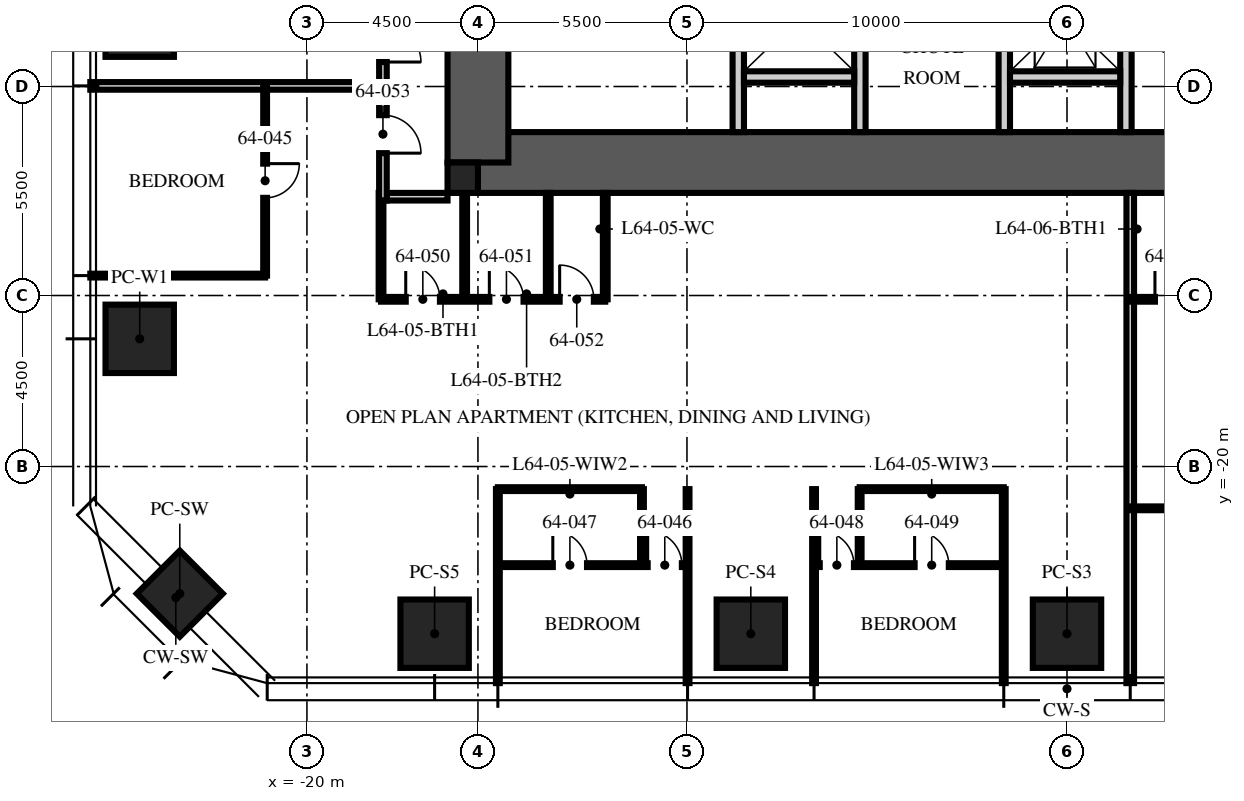
"""IFC4 building model, lengths in metres.
Left out: names, types, materials, properties, quantities, classifications, styles, units other than length and angle.
Written with IfcOpenShell. Run it as: python <this file> out.ifc"""

import sys

from ifc_helpers import new_model, si_unit, direction, frame, frame_2d, origin, origin_2d, place, context, subcontext, project, spatial, rectangle, extrude, element, fill, save


model = new_model("IFC4")
c1 = context("Model", 3, precision=1e-05, world=origin(), true_north=direction((0.0, 1.0)))
c2 = subcontext(c1, "Body", "Model", "MODEL_VIEW")
j1 = project(units=[si_unit("LENGTHUNIT", "METRE"), si_unit("PLANEANGLEUNIT", "RADIAN")], contexts=[c1])
p1 = place(None, origin())
s1 = spatial("IfcSite", under=j1, at=p1, CompositionType="ELEMENT")
p2 = place(p1, origin())
s2 = spatial("IfcBuilding", under=s1, at=p2, CompositionType="ELEMENT")
p3 = place(p2, frame((0.0, 0.0, 255.75)))
s3 = spatial("IfcBuildingStorey", under=s2, at=p3, CompositionType="ELEMENT", Elevation=255.75)
p4 = place(p3, frame((-15.5, -12.0, -0.25), z_axis=(0.0, 0.0, 1.0), x_axis=(1.0, 0.0, 0.0)))
e1 = element("IfcWall", 1, at=p4, inside=s3, PredefinedType="SHEAR", context=c2, shape_type="SweptSolid", body=[
    extrude(rectangle(XDim=31.0, YDim=1.6, at=frame_2d((15.5, 0.0))), origin(), (0.0, 0.0, 1.0), 3.75),
])
p5 = place(p3, frame((-15.5, -12.0, -0.25), z_axis=(0.0, 0.0, 1.0), x_axis=(0.0, 1.0, 0.0)))
e2 = element("IfcWall", 2, at=p5, inside=s3, PredefinedType="SHEAR", context=c2, shape_type="SweptSolid", body=[
    extrude(rectangle(XDim=24.0, YDim=1.6, at=frame_2d((12.0, 0.0))), origin(), (0.0, 0.0, 1.0), 3.75),
])
p6 = place(p5, frame((3.2, 0.0, 0.25)))
e3 = element("IfcOpeningElement", 3, at=p6, cuts=e2, PredefinedType="OPENING", context=c2, shape_type="SweptSolid", body=[
    extrude(rectangle(XDim=1.2, YDim=2.1, at=frame_2d((0.6, 1.05))), frame((0.0, 0.81, 0.0), z_axis=(0.0, -1.0, 0.0), x_axis=(1.0, 0.0, 0.0)), (0.0, 0.0, 1.0), 1.62),
])
p7 = place(p5, frame((19.3, 0.0, 0.25)))
e4 = element("IfcOpeningElement", 4, at=p7, cuts=e2, PredefinedType="OPENING", context=c2, shape_type="SweptSolid", body=[
    extrude(rectangle(XDim=1.8, YDim=2.1, at=frame_2d((0.9, 1.05))), frame((0.0, 0.81, 0.0), z_axis=(0.0, -1.0, 0.0), x_axis=(1.0, 0.0, 0.0)), (0.0, 0.0, 1.0), 1.62),
])
p8 = place(p3, frame((-15.9, -12.4, -0.25), z_axis=(0.0, 0.0, 1.0), x_axis=(1.0, 0.0, 0.0)))
e5 = element("IfcColumn", 5, at=p8, inside=s3, PredefinedType="COLUMN", context=c2, shape_type="SweptSolid", body=[
    extrude(rectangle(XDim=0.8, YDim=0.8, at=origin_2d()), origin(), (0.0, 0.0, 1.0), 3.75),
])
for number, where, z_axis, x_axis in (
    (6, (0.0, -24.4, 0.0), (0.0, 0.0, 1.0), (1.0, 0.0, 0.0)),
    (7, (-8.32, -24.4, 0.0), (0.0, 0.0, 1.0), (1.0, 0.0, 0.0)),
    (8, (-16.64, -24.4, 0.0), (0.0, 0.0, 1.0), (1.0, 0.0, 0.0)),
    (9, (-24.4, -16.64, 0.0), (0.0, 0.0, 1.0), (0.0, 1.0, 0.0)),
    (10, (-24.4, -8.32, 0.0), (0.0, 0.0, 1.0), (0.0, 1.0, 0.0)),
):
    element("IfcColumn", number, at=place(p3, frame(where, z_axis=z_axis, x_axis=x_axis)), inside=s3, PredefinedType="COLUMN", context=c2, shape_type="SweptSolid", body=[
        extrude(rectangle(XDim=1.8, YDim=1.8, at=origin_2d()), origin(), (0.0, 0.0, 1.0), 3.75),
    ])
p9 = place(p3, frame((-23.346, -23.346, 0.0), z_axis=(0.0, 0.0, 1.0), x_axis=(0.707106781187, -0.707106781187, 0.0)))
e11 = element("IfcColumn", 11, at=p9, inside=s3, PredefinedType="COLUMN", context=c2, shape_type="SweptSolid", body=[
    extrude(rectangle(XDim=1.6, YDim=1.6, at=origin_2d()), origin(), (0.0, 0.0, 1.0), 3.75),
])
p10 = place(p3, frame((-8.65, -11.2, 0.0), z_axis=(0.0, 0.0, 1.0), x_axis=(0.0, 1.0, 0.0)))
e12 = element("IfcWall", 12, at=p10, inside=s3, PredefinedType="PARTITIONING", context=c2, shape_type="SweptSolid", body=[
    extrude(rectangle(XDim=6.3, YDim=0.3, at=frame_2d((3.15, 0.0))), origin(), (0.0, 0.0, 1.0), 3.5),
])
p11 = place(p10, frame((2.45, 0.0, 0.0)))
e13 = element("IfcOpeningElement", 13, at=p11, cuts=e12, PredefinedType="OPENING", context=c2, shape_type="SweptSolid", body=[
    extrude(rectangle(XDim=1.1, YDim=2.1, at=frame_2d((0.55, 1.05))), frame((0.0, 0.16, 0.0), z_axis=(0.0, -1.0, 0.0), x_axis=(1.0, 0.0, 0.0)), (0.0, 0.0, 1.0), 0.32),
])
for number, where, z_axis, x_axis in (
    (14, (-5.45, -11.2, 0.0), (0.0, 0.0, 1.0), (0.0, 1.0, 0.0)),
    (15, (-1.65, -11.2, 0.0), (0.0, 0.0, 1.0), (0.0, 1.0, 0.0)),
    (16, (1.55, -11.2, 0.0), (0.0, 0.0, 1.0), (0.0, 1.0, 0.0)),
):
    element("IfcWall", number, at=place(p3, frame(where, z_axis=z_axis, x_axis=x_axis)), inside=s3, PredefinedType="PARTITIONING", context=c2, shape_type="SweptSolid", body=[
        extrude(rectangle(XDim=4.4, YDim=0.3, at=frame_2d((2.2, 0.0))), origin(), (0.0, 0.0, 1.0), 3.5),
    ])
for number, where, z_axis, x_axis in (
    (17, (-8.5, -9.75, 0.0), (0.0, 0.0, 1.0), (1.0, 0.0, 0.0)),
    (18, (-1.5, -9.75, 0.0), (0.0, 0.0, 1.0), (1.0, 0.0, 0.0)),
):
    element("IfcWall", number, at=place(p3, frame(where, z_axis=z_axis, x_axis=x_axis)), inside=s3, PredefinedType="PARTITIONING", context=c2, shape_type="SweptSolid", body=[
        extrude(rectangle(XDim=2.9, YDim=0.3, at=frame_2d((1.45, 0.0))), origin(), (0.0, 0.0, 1.0), 3.5),
    ])
p12 = place(p3, frame((-16.3, -12.9, 0.0), z_axis=(0.0, 0.0, 1.0), x_axis=(-1.0, 0.0, 0.0)))
e19 = element("IfcWall", 19, at=p12, inside=s3, PredefinedType="PARTITIONING", context=c2, shape_type="SweptSolid", body=[
    extrude(rectangle(XDim=1.6, YDim=0.2, at=frame_2d((0.8, 0.0))), origin(), (0.0, 0.0, 1.0), 2.3),
])
p13 = place(p3, frame((-18.1, -9.984, 0.0), z_axis=(0.0, 0.0, 1.0), x_axis=(-1.0, 0.0, 0.0)))
e20 = element("IfcWall", 20, at=p13, inside=s3, PredefinedType="PARTITIONING", context=c2, shape_type="SweptSolid", body=[
    extrude(rectangle(XDim=7.6, YDim=0.2, at=frame_2d((3.8, 0.0))), origin(), (0.0, 0.0, 1.0), 2.91),
])
p14 = place(p3, frame((-21.1, -14.976, 0.0), z_axis=(0.0, 0.0, 1.0), x_axis=(-1.0, 0.0, 0.0)))
e21 = element("IfcWall", 21, at=p14, inside=s3, PredefinedType="PARTITIONING", context=c2, shape_type="SweptSolid", body=[
    extrude(rectangle(XDim=4.6, YDim=0.1, at=frame_2d((2.3, 0.0))), origin(), (0.0, 0.0, 1.0), 2.91),
])
for number, where, z_axis, x_axis in (
    (22, (-14.976, -20.595, 0.0), (0.0, 0.0, 1.0), (0.0, -1.0, 0.0)),
    (23, (-9.984, -20.595, 0.0), (0.0, 0.0, 1.0), (0.0, -1.0, 0.0)),
    (24, (-6.656, -20.595, 0.0), (0.0, 0.0, 1.0), (0.0, -1.0, 0.0)),
    (25, (-1.664, -20.595, 0.0), (0.0, 0.0, 1.0), (0.0, -1.0, 0.0)),
):
    element("IfcWall", number, at=place(p3, frame(where, z_axis=z_axis, x_axis=x_axis)), inside=s3, PredefinedType="PARTITIONING", context=c2, shape_type="SweptSolid", body=[
        extrude(rectangle(XDim=5.105, YDim=0.1, at=frame_2d((2.552, 0.0))), origin(), (0.0, 0.0, 1.0), 2.91),
    ])
p15 = place(p3, frame((1.664, -12.8, 0.0), z_axis=(0.0, 0.0, 1.0), x_axis=(0.0, -1.0, 0.0)))
e26 = element("IfcWall", 26, at=p15, inside=s3, PredefinedType="PARTITIONING", context=c2, shape_type="SweptSolid", body=[
    extrude(rectangle(XDim=12.9, YDim=0.2, at=frame_2d((6.45, 0.0))), origin(), (0.0, 0.0, 1.0), 2.91),
])
p16 = place(p3, frame((-21.1, -9.984, 0.0), z_axis=(0.0, 0.0, 1.0), x_axis=(0.0, -1.0, 0.0)))
e27 = element("IfcWall", 27, at=p16, inside=s3, PredefinedType="PARTITIONING", context=c2, shape_type="SweptSolid", body=[
    extrude(rectangle(XDim=4.992, YDim=0.1, at=frame_2d((2.496, 0.0))), origin(), (0.0, 0.0, 1.0), 2.81),
])
p17 = place(p16, frame((2.046, 0.0, 0.0)))
e28 = element("IfcOpeningElement", 28, at=p17, cuts=e27, PredefinedType="OPENING", context=c2, shape_type="SweptSolid", body=[
    extrude(rectangle(XDim=0.9, YDim=2.1, at=frame_2d((0.45, 1.05))), frame((0.0, 0.06, 0.0), z_axis=(0.0, -1.0, 0.0), x_axis=(1.0, 0.0, 0.0)), (0.0, 0.0, 1.0), 0.12),
])
p18 = place(p3, frame((-14.976, -22.595, 0.0), z_axis=(0.0, 0.0, 1.0), x_axis=(1.0, 0.0, 0.0)))
e29 = element("IfcWall", 29, at=p18, inside=s3, PredefinedType="PARTITIONING", context=c2, shape_type="SweptSolid", body=[
    extrude(rectangle(XDim=4.992, YDim=0.1, at=frame_2d((2.496, 0.0))), origin(), (0.0, 0.0, 1.0), 2.81),
])
p19 = place(p18, frame((3.942, 0.0, 0.0)))
e30 = element("IfcOpeningElement", 30, at=p19, cuts=e29, PredefinedType="OPENING", context=c2, shape_type="SweptSolid", body=[
    extrude(rectangle(XDim=0.9, YDim=2.1, at=frame_2d((0.45, 1.05))), frame((0.0, 0.06, 0.0), z_axis=(0.0, -1.0, 0.0), x_axis=(1.0, 0.0, 0.0)), (0.0, 0.0, 1.0), 0.12),
])
p20 = place(p18, frame((1.446, 0.0, 0.0)))
e31 = element("IfcOpeningElement", 31, at=p20, cuts=e29, PredefinedType="OPENING", context=c2, shape_type="SweptSolid", body=[
    extrude(rectangle(XDim=0.9, YDim=2.1, at=frame_2d((0.45, 1.05))), frame((0.0, 0.06, 0.0), z_axis=(0.0, -1.0, 0.0), x_axis=(1.0, 0.0, 0.0)), (0.0, 0.0, 1.0), 0.12),
])
p21 = place(p3, frame((-11.184, -20.595, 0.0), z_axis=(0.0, 0.0, 1.0), x_axis=(0.0, -1.0, 0.0)))
e32 = element("IfcWall", 32, at=p21, inside=s3, PredefinedType="PARTITIONING", context=c2, shape_type="SweptSolid", body=[
    extrude(rectangle(XDim=2.0, YDim=0.1, at=frame_2d((1.0, 0.0))), origin(), (0.0, 0.0, 1.0), 3.5),
])
p22 = place(p3, frame((-14.976, -20.595, 0.0), z_axis=(0.0, 0.0, 1.0), x_axis=(1.0, 0.0, 0.0)))
e33 = element("IfcWall", 33, at=p22, inside=s3, PredefinedType="PARTITIONING", context=c2, shape_type="SweptSolid", body=[
    extrude(rectangle(XDim=3.792, YDim=0.1, at=frame_2d((1.896, 0.0))), origin(), (0.0, 0.0, 1.0), 2.81),
])
p23 = place(p3, frame((-6.656, -22.595, 0.0), z_axis=(0.0, 0.0, 1.0), x_axis=(1.0, 0.0, 0.0)))
e34 = element("IfcWall", 34, at=p23, inside=s3, PredefinedType="PARTITIONING", context=c2, shape_type="SweptSolid", body=[
    extrude(rectangle(XDim=4.992, YDim=0.1, at=frame_2d((2.496, 0.0))), origin(), (0.0, 0.0, 1.0), 2.81),
])
p24 = place(p23, frame((0.15, 0.0, 0.0)))
e35 = element("IfcOpeningElement", 35, at=p24, cuts=e34, PredefinedType="OPENING", context=c2, shape_type="SweptSolid", body=[
    extrude(rectangle(XDim=0.9, YDim=2.1, at=frame_2d((0.45, 1.05))), frame((0.0, 0.06, 0.0), z_axis=(0.0, -1.0, 0.0), x_axis=(1.0, 0.0, 0.0)), (0.0, 0.0, 1.0), 0.12),
])
p25 = place(p23, frame((2.646, 0.0, 0.0)))
e36 = element("IfcOpeningElement", 36, at=p25, cuts=e34, PredefinedType="OPENING", context=c2, shape_type="SweptSolid", body=[
    extrude(rectangle(XDim=0.9, YDim=2.1, at=frame_2d((0.45, 1.05))), frame((0.0, 0.06, 0.0), z_axis=(0.0, -1.0, 0.0), x_axis=(1.0, 0.0, 0.0)), (0.0, 0.0, 1.0), 0.12),
])
p26 = place(p3, frame((-5.456, -20.595, 0.0), z_axis=(0.0, 0.0, 1.0), x_axis=(0.0, -1.0, 0.0)))
e37 = element("IfcWall", 37, at=p26, inside=s3, PredefinedType="PARTITIONING", context=c2, shape_type="SweptSolid", body=[
    extrude(rectangle(XDim=2.0, YDim=0.1, at=frame_2d((1.0, 0.0))), origin(), (0.0, 0.0, 1.0), 3.5),
])
p27 = place(p3, frame((-5.456, -20.595, 0.0), z_axis=(0.0, 0.0, 1.0), x_axis=(1.0, 0.0, 0.0)))
e38 = element("IfcWall", 38, at=p27, inside=s3, PredefinedType="PARTITIONING", context=c2, shape_type="SweptSolid", body=[
    extrude(rectangle(XDim=3.792, YDim=0.1, at=frame_2d((1.896, 0.0))), origin(), (0.0, 0.0, 1.0), 2.81),
])
p28 = place(p3, frame((-18.05, -15.6, 0.0), z_axis=(0.0, 0.0, 1.0), x_axis=(1.0, 0.0, 0.0)))
e39 = element("IfcWall", 39, at=p28, inside=s3, PredefinedType="PARTITIONING", context=c2, shape_type="SweptSolid", body=[
    extrude(rectangle(XDim=5.9, YDim=0.125, at=frame_2d((2.95, 0.0))), origin(), (0.0, 0.0, 1.0), 2.3),
])
p29 = place(p28, frame((0.65, 0.0, 0.0)))
e40 = element("IfcOpeningElement", 40, at=p29, cuts=e39, PredefinedType="OPENING", context=c2, shape_type="SweptSolid", body=[
    extrude(rectangle(XDim=0.9, YDim=2.1, at=frame_2d((0.45, 1.05))), frame((0.0, 0.073, 0.0), z_axis=(0.0, -1.0, 0.0), x_axis=(1.0, 0.0, 0.0)), (0.0, 0.0, 1.0), 0.145),
])
p30 = place(p28, frame((2.85, 0.0, 0.0)))
e41 = element("IfcOpeningElement", 41, at=p30, cuts=e39, PredefinedType="OPENING", context=c2, shape_type="SweptSolid", body=[
    extrude(rectangle(XDim=0.9, YDim=2.1, at=frame_2d((0.45, 1.05))), frame((0.0, 0.073, 0.0), z_axis=(0.0, -1.0, 0.0), x_axis=(1.0, 0.0, 0.0)), (0.0, 0.0, 1.0), 0.145),
])
p31 = place(p28, frame((4.7, 0.0, 0.0)))
e42 = element("IfcOpeningElement", 42, at=p31, cuts=e39, PredefinedType="OPENING", context=c2, shape_type="SweptSolid", body=[
    extrude(rectangle(XDim=0.9, YDim=2.1, at=frame_2d((0.45, 1.05))), frame((0.0, 0.073, 0.0), z_axis=(0.0, -1.0, 0.0), x_axis=(1.0, 0.0, 0.0)), (0.0, 0.0, 1.0), 0.145),
])
for number, where, z_axis, x_axis in (
    (43, (-18.05, -12.8, 0.0), (0.0, 0.0, 1.0), (0.0, -1.0, 0.0)),
    (44, (-15.85, -12.8, 0.0), (0.0, 0.0, 1.0), (0.0, -1.0, 0.0)),
):
    element("IfcWall", number, at=place(p3, frame(where, z_axis=z_axis, x_axis=x_axis)), inside=s3, PredefinedType="PARTITIONING", context=c2, shape_type="SweptSolid", body=[
        extrude(rectangle(XDim=2.8, YDim=0.125, at=frame_2d((1.4, 0.0))), origin(), (0.0, 0.0, 1.0), 2.3),
    ])
for number, where, z_axis, x_axis in (
    (45, (-13.65, -12.8, 0.0), (0.0, 0.0, 1.0), (0.0, -1.0, 0.0)),
    (46, (-12.15, -12.8, 0.0), (0.0, 0.0, 1.0), (0.0, -1.0, 0.0)),
):
    element("IfcWall", number, at=place(p3, frame(where, z_axis=z_axis, x_axis=x_axis)), inside=s3, PredefinedType="PARTITIONING", context=c2, shape_type="SweptSolid", body=[
        extrude(rectangle(XDim=2.8, YDim=0.125, at=frame_2d((1.4, 0.0))), origin(), (0.0, 0.0, 1.0), 3.5),
    ])
p32 = place(p3, frame((1.664, -21.1, 0.0), z_axis=(0.0, 0.0, 1.0), x_axis=(1.0, 0.0, 0.0)))
e47 = element("IfcWall", 47, at=p32, inside=s3, PredefinedType="PARTITIONING", context=c2, shape_type="SweptSolid", body=[
    extrude(rectangle(XDim=4.992, YDim=0.1, at=frame_2d((2.496, 0.0))), origin(), (0.0, 0.0, 1.0), 2.81),
])
p33 = place(p32, frame((2.046, 0.0, 0.0)))
e48 = element("IfcOpeningElement", 48, at=p33, cuts=e47, PredefinedType="OPENING", context=c2, shape_type="SweptSolid", body=[
    extrude(rectangle(XDim=0.9, YDim=2.1, at=frame_2d((0.45, 1.05))), frame((0.0, 0.06, 0.0), z_axis=(0.0, -1.0, 0.0), x_axis=(1.0, 0.0, 0.0)), (0.0, 0.0, 1.0), 0.12),
])
p34 = place(p3, frame((1.664, -15.6, 0.0), z_axis=(0.0, 0.0, 1.0), x_axis=(1.0, 0.0, 0.0)))
e49 = element("IfcWall", 49, at=p34, inside=s3, PredefinedType="PARTITIONING", context=c2, shape_type="SweptSolid", body=[
    extrude(rectangle(XDim=3.7, YDim=0.125, at=frame_2d((1.85, 0.0))), origin(), (0.0, 0.0, 1.0), 2.81),
])
p35 = place(p34, frame((0.65, 0.0, 0.0)))
e50 = element("IfcOpeningElement", 50, at=p35, cuts=e49, PredefinedType="OPENING", context=c2, shape_type="SweptSolid", body=[
    extrude(rectangle(XDim=0.9, YDim=2.1, at=frame_2d((0.45, 1.05))), frame((0.0, 0.073, 0.0), z_axis=(0.0, -1.0, 0.0), x_axis=(1.0, 0.0, 0.0)), (0.0, 0.0, 1.0), 0.145),
])
p36 = place(p34, frame((2.5, 0.0, 0.0)))
e51 = element("IfcOpeningElement", 51, at=p36, cuts=e49, PredefinedType="OPENING", context=c2, shape_type="SweptSolid", body=[
    extrude(rectangle(XDim=0.9, YDim=2.1, at=frame_2d((0.45, 1.05))), frame((0.0, 0.073, 0.0), z_axis=(0.0, -1.0, 0.0), x_axis=(1.0, 0.0, 0.0)), (0.0, 0.0, 1.0), 0.145),
])
p37 = place(p3, frame((-18.0, 13.0, 0.0), z_axis=(0.0, 0.0, 1.0), x_axis=(0.0, -1.0, 0.0)))
e52 = element("IfcWall", 52, at=p37, inside=s3, PredefinedType="PARTITIONING", context=c2, shape_type="SweptSolid", body=[
    extrude(rectangle(XDim=26.0, YDim=0.2, at=frame_2d((13.0, 0.0))), origin(), (0.0, 0.0, 1.0), 2.6),
])
p38 = place(p37, frame((9.6, 0.0, 0.0)))
e53 = element("IfcOpeningElement", 53, at=p38, cuts=e52, PredefinedType="OPENING", context=c2, shape_type="SweptSolid", body=[
    extrude(rectangle(XDim=1.0, YDim=2.2, at=frame_2d((0.5, 1.1))), frame((0.0, 0.11, 0.0), z_axis=(0.0, -1.0, 0.0), x_axis=(1.0, 0.0, 0.0)), (0.0, 0.0, 1.0), 0.22),
])
p39 = place(p37, frame((21.356, 0.0, 0.0)))
e54 = element("IfcOpeningElement", 54, at=p39, cuts=e52, PredefinedType="OPENING", context=c2, shape_type="SweptSolid", body=[
    extrude(rectangle(XDim=1.0, YDim=2.2, at=frame_2d((0.5, 1.1))), frame((0.0, 0.11, 0.0), z_axis=(0.0, -1.0, 0.0), x_axis=(1.0, 0.0, 0.0)), (0.0, 0.0, 1.0), 0.22),
])
p40 = place(p37, frame((23.754, 0.0, 0.0)))
e55 = element("IfcOpeningElement", 55, at=p40, cuts=e52, PredefinedType="OPENING", context=c2, shape_type="SweptSolid", body=[
    extrude(rectangle(XDim=1.0, YDim=2.2, at=frame_2d((0.5, 1.1))), frame((0.0, 0.11, 0.0), z_axis=(0.0, -1.0, 0.0), x_axis=(1.0, 0.0, 0.0)), (0.0, 0.0, 1.0), 0.22),
])
p41 = place(p39, origin())
e56 = element("IfcDoor", 56, at=p41, inside=s3, OperationType="SINGLE_SWING_RIGHT", PredefinedType="DOOR", context=c2, shape_type="SweptSolid", body=[
    extrude(rectangle(XDim=1.0, YDim=2.2, at=frame_2d((0.5, 1.1))), frame((0.0, 0.025, 0.0), z_axis=(0.0, -1.0, 0.0), x_axis=(1.0, 0.0, 0.0)), (0.0, 0.0, 1.0), 0.05),
])
fill(e54, e56)
p42 = place(p17, origin())
e57 = element("IfcDoor", 57, at=p42, inside=s3, OperationType="SINGLE_SWING_LEFT", PredefinedType="DOOR", context=c2, shape_type="SweptSolid", body=[
    extrude(rectangle(XDim=0.9, YDim=2.1, at=frame_2d((0.45, 1.05))), frame((0.0, 0.025, 0.0), z_axis=(0.0, -1.0, 0.0), x_axis=(1.0, 0.0, 0.0)), (0.0, 0.0, 1.0), 0.05),
])
fill(e28, e57)
p43 = place(p19, origin())
e58 = element("IfcDoor", 58, at=p43, inside=s3, OperationType="SINGLE_SWING_LEFT", PredefinedType="DOOR", context=c2, shape_type="SweptSolid", body=[
    extrude(rectangle(XDim=0.9, YDim=2.1, at=frame_2d((0.45, 1.05))), frame((0.0, 0.025, 0.0), z_axis=(0.0, -1.0, 0.0), x_axis=(1.0, 0.0, 0.0)), (0.0, 0.0, 1.0), 0.05),
])
fill(e30, e58)
p44 = place(p20, origin())
e59 = element("IfcDoor", 59, at=p44, inside=s3, OperationType="SINGLE_SWING_LEFT", PredefinedType="DOOR", context=c2, shape_type="SweptSolid", body=[
    extrude(rectangle(XDim=0.9, YDim=2.1, at=frame_2d((0.45, 1.05))), frame((0.0, 0.025, 0.0), z_axis=(0.0, -1.0, 0.0), x_axis=(1.0, 0.0, 0.0)), (0.0, 0.0, 1.0), 0.05),
])
fill(e31, e59)
p45 = place(p24, origin())
e60 = element("IfcDoor", 60, at=p45, inside=s3, OperationType="SINGLE_SWING_LEFT", PredefinedType="DOOR", context=c2, shape_type="SweptSolid", body=[
    extrude(rectangle(XDim=0.9, YDim=2.1, at=frame_2d((0.45, 1.05))), frame((0.0, 0.025, 0.0), z_axis=(0.0, -1.0, 0.0), x_axis=(1.0, 0.0, 0.0)), (0.0, 0.0, 1.0), 0.05),
])
fill(e35, e60)
p46 = place(p25, origin())
e61 = element("IfcDoor", 61, at=p46, inside=s3, OperationType="SINGLE_SWING_LEFT", PredefinedType="DOOR", context=c2, shape_type="SweptSolid", body=[
    extrude(rectangle(XDim=0.9, YDim=2.1, at=frame_2d((0.45, 1.05))), frame((0.0, 0.025, 0.0), z_axis=(0.0, -1.0, 0.0), x_axis=(1.0, 0.0, 0.0)), (0.0, 0.0, 1.0), 0.05),
])
fill(e36, e61)
p47 = place(p29, origin())
e62 = element("IfcDoor", 62, at=p47, inside=s3, OperationType="SINGLE_SWING_LEFT", PredefinedType="DOOR", context=c2, shape_type="SweptSolid", body=[
    extrude(rectangle(XDim=0.9, YDim=2.1, at=frame_2d((0.45, 1.05))), frame((0.0, 0.025, 0.0), z_axis=(0.0, -1.0, 0.0), x_axis=(1.0, 0.0, 0.0)), (0.0, 0.0, 1.0), 0.05),
])
fill(e40, e62)
p48 = place(p30, origin())
e63 = element("IfcDoor", 63, at=p48, inside=s3, OperationType="SINGLE_SWING_LEFT", PredefinedType="DOOR", context=c2, shape_type="SweptSolid", body=[
    extrude(rectangle(XDim=0.9, YDim=2.1, at=frame_2d((0.45, 1.05))), frame((0.0, 0.025, 0.0), z_axis=(0.0, -1.0, 0.0), x_axis=(1.0, 0.0, 0.0)), (0.0, 0.0, 1.0), 0.05),
])
fill(e41, e63)
p49 = place(p31, origin())
e64 = element("IfcDoor", 64, at=p49, inside=s3, OperationType="SINGLE_SWING_LEFT", PredefinedType="DOOR", context=c2, shape_type="SweptSolid", body=[
    extrude(rectangle(XDim=0.9, YDim=2.1, at=frame_2d((0.45, 1.05))), frame((0.0, 0.025, 0.0), z_axis=(0.0, -1.0, 0.0), x_axis=(1.0, 0.0, 0.0)), (0.0, 0.0, 1.0), 0.05),
])
fill(e42, e64)
p50 = place(p40, origin())
e65 = element("IfcDoor", 65, at=p50, inside=s3, OperationType="SINGLE_SWING_RIGHT", PredefinedType="DOOR", context=c2, shape_type="SweptSolid", body=[
    extrude(rectangle(XDim=1.0, YDim=2.2, at=frame_2d((0.5, 1.1))), frame((0.0, 0.025, 0.0), z_axis=(0.0, -1.0, 0.0), x_axis=(1.0, 0.0, 0.0)), (0.0, 0.0, 1.0), 0.05),
])
fill(e55, e65)
p51 = place(p35, origin())
e66 = element("IfcDoor", 66, at=p51, inside=s3, OperationType="SINGLE_SWING_LEFT", PredefinedType="DOOR", context=c2, shape_type="SweptSolid", body=[
    extrude(rectangle(XDim=0.9, YDim=2.1, at=frame_2d((0.45, 1.05))), frame((0.0, 0.025, 0.0), z_axis=(0.0, -1.0, 0.0), x_axis=(1.0, 0.0, 0.0)), (0.0, 0.0, 1.0), 0.05),
])
fill(e50, e66)
save(model, sys.argv[1])
